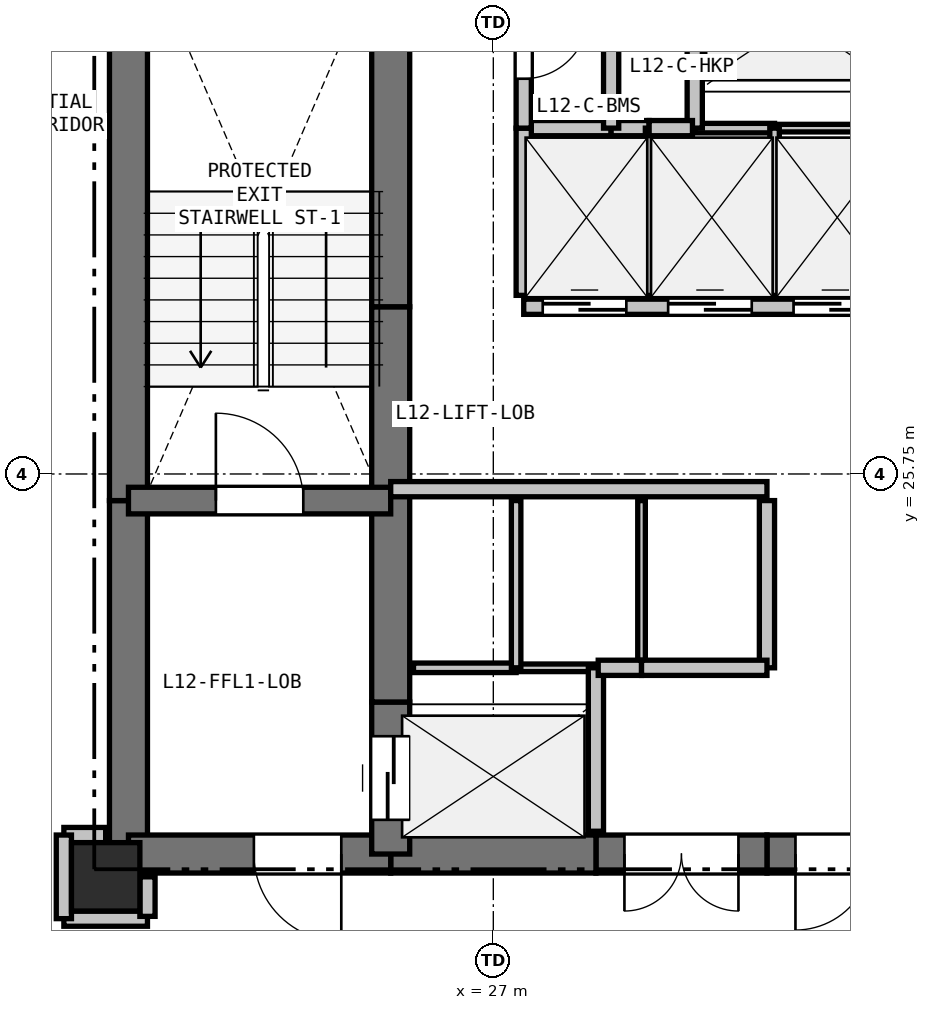
"""IFC4 building model, lengths in metres.
Left out: names, types, materials, properties, quantities, classifications, styles, units other than length and angle.
Written with IfcOpenShell. Run it as: python <this file> out.ifc"""

import sys

from ifc_helpers import new_model, si_unit, direction, frame, frame_2d, origin, origin_2d, place, context, subcontext, project, spatial, rectangle, extrude, element, fill, save


model = new_model("IFC4")
c1 = context("Model", 3, precision=1e-05, world=origin(), true_north=direction((0.0, 1.0)))
c2 = subcontext(c1, "Body", "Model", "MODEL_VIEW")
j1 = project(units=[si_unit("LENGTHUNIT", "METRE"), si_unit("PLANEANGLEUNIT", "RADIAN")], contexts=[c1])
p1 = place(None, origin())
s1 = spatial("IfcSite", under=j1, at=p1, CompositionType="ELEMENT")
p2 = place(p1, origin())
s2 = spatial("IfcBuilding", under=s1, at=p2, CompositionType="ELEMENT")
p3 = place(p2, frame((0.0, 0.0, 45.6)))
s3 = spatial("IfcBuildingStorey", under=s2, at=p3, CompositionType="ELEMENT", Elevation=45.6)
p4 = place(p3, frame((21.9, 20.45, 0.0), z_axis=(0.0, 0.0, 1.0), x_axis=(1.0, 0.0, 0.0)))
e1 = element("IfcColumn", 1, at=p4, inside=s3, PredefinedType="COLUMN", context=c2, shape_type="SweptSolid", body=[
    extrude(rectangle(XDim=0.9, YDim=0.9, at=origin_2d()), origin(), (0.0, 0.0, 1.0), 3.3),
])
p5 = place(p3, frame((22.2, 20.75, 0.0), z_axis=(0.0, 0.0, 1.0), x_axis=(0.0, 1.0, 0.0)))
e2 = element("IfcWall", 2, at=p5, inside=s3, PredefinedType="SHEAR", context=c2, shape_type="SweptSolid", body=[
    extrude(rectangle(XDim=4.65, YDim=0.5, at=frame_2d((2.325, 0.0))), origin(), (0.0, 0.0, 1.0), 3.04),
])
p6 = place(p3, frame((22.2, 25.4, 0.0), z_axis=(0.0, 0.0, 1.0), x_axis=(0.0, 1.0, 0.0)))
e3 = element("IfcWall", 3, at=p6, inside=s3, PredefinedType="SHEAR", context=c2, shape_type="SweptSolid", body=[
    extrude(rectangle(XDim=7.35, YDim=0.5, at=frame_2d((3.675, 0.0))), origin(), (0.0, 0.0, 1.0), 3.04),
])
p7 = place(p3, frame((32.35, 20.75, 0.0), z_axis=(0.0, 0.0, 1.0), x_axis=(-1.0, 0.0, 0.0)))
e4 = element("IfcWall", 4, at=p7, inside=s3, PredefinedType="SHEAR", context=c2, shape_type="SweptSolid", body=[
    extrude(rectangle(XDim=1.75, YDim=0.5, at=frame_2d((0.875, 0.0))), origin(), (0.0, 0.0, 1.0), 3.04),
])
p8 = place(p7, frame((0.375, 0.0, 0.0)))
e5 = element("IfcOpeningElement", 5, at=p8, cuts=e4, PredefinedType="OPENING", context=c2, shape_type="SweptSolid", body=[
    extrude(rectangle(XDim=1.0, YDim=2.15, at=frame_2d((0.5, 1.075))), frame((0.0, 0.26, 0.0), z_axis=(0.0, -1.0, 0.0), x_axis=(1.0, 0.0, 0.0)), (0.0, 0.0, 1.0), 0.52),
])
p9 = place(p3, frame((30.6, 20.75, 0.0), z_axis=(0.0, 0.0, 1.0), x_axis=(-1.0, 0.0, 0.0)))
e6 = element("IfcWall", 6, at=p9, inside=s3, PredefinedType="SHEAR", context=c2, shape_type="SweptSolid", body=[
    extrude(rectangle(XDim=2.25, YDim=0.5, at=frame_2d((1.125, 0.0))), origin(), (0.0, 0.0, 1.0), 3.04),
])
p10 = place(p9, frame((0.375, 0.0, 0.0)))
e7 = element("IfcOpeningElement", 7, at=p10, cuts=e6, PredefinedType="OPENING", context=c2, shape_type="SweptSolid", body=[
    extrude(rectangle(XDim=1.5, YDim=2.2, at=frame_2d((0.75, 1.1))), frame((0.0, 0.26, 0.0), z_axis=(0.0, -1.0, 0.0), x_axis=(1.0, 0.0, 0.0)), (0.0, 0.0, 1.0), 0.52),
])
p11 = place(p3, frame((28.35, 20.75, 0.0), z_axis=(0.0, 0.0, 1.0), x_axis=(-1.0, 0.0, 0.0)))
e8 = element("IfcWall", 8, at=p11, inside=s3, PredefinedType="SHEAR", context=c2, shape_type="SweptSolid", body=[
    extrude(rectangle(XDim=2.7, YDim=0.5, at=frame_2d((1.35, 0.0))), origin(), (0.0, 0.0, 1.0), 3.04),
])
p12 = place(p3, frame((25.65, 20.75, 0.0), z_axis=(0.0, 0.0, 1.0), x_axis=(-1.0, 0.0, 0.0)))
e9 = element("IfcWall", 9, at=p12, inside=s3, PredefinedType="SHEAR", context=c2, shape_type="SweptSolid", body=[
    extrude(rectangle(XDim=3.45, YDim=0.5, at=frame_2d((1.725, 0.0))), origin(), (0.0, 0.0, 1.0), 3.04),
])
p13 = place(p12, frame((0.65, 0.0, 0.0)))
e10 = element("IfcOpeningElement", 10, at=p13, cuts=e9, PredefinedType="OPENING", context=c2, shape_type="SweptSolid", body=[
    extrude(rectangle(XDim=1.15, YDim=2.15, at=frame_2d((0.575, 1.075))), frame((0.0, 0.26, 0.0), z_axis=(0.0, -1.0, 0.0), x_axis=(1.0, 0.0, 0.0)), (0.0, 0.0, 1.0), 0.52),
])
p14 = place(p3, frame((25.65, 20.75, 0.0), z_axis=(0.0, 0.0, 1.0), x_axis=(0.0, 1.0, 0.0)))
e11 = element("IfcWall", 11, at=p14, inside=s3, PredefinedType="SHEAR", context=c2, shape_type="SweptSolid", body=[
    extrude(rectangle(XDim=2.0, YDim=0.5, at=frame_2d((1.0, 0.0))), origin(), (0.0, 0.0, 1.0), 3.04),
])
p15 = place(p14, frame((0.45, 0.0, 0.0)))
e12 = element("IfcOpeningElement", 12, at=p15, cuts=e11, PredefinedType="OPENING", context=c2, shape_type="SweptSolid", body=[
    extrude(rectangle(XDim=1.1, YDim=2.15, at=frame_2d((0.55, 1.075))), frame((0.0, 0.26, 0.0), z_axis=(0.0, -1.0, 0.0), x_axis=(1.0, 0.0, 0.0)), (0.0, 0.0, 1.0), 0.52),
])
p16 = place(p3, frame((25.65, 22.75, 0.0), z_axis=(0.0, 0.0, 1.0), x_axis=(0.0, 1.0, 0.0)))
e13 = element("IfcWall", 13, at=p16, inside=s3, PredefinedType="SHEAR", context=c2, shape_type="SweptSolid", body=[
    extrude(rectangle(XDim=2.8, YDim=0.5, at=frame_2d((1.4, 0.0))), origin(), (0.0, 0.0, 1.0), 3.04),
])
p17 = place(p3, frame((25.65, 25.55, 0.0), z_axis=(0.0, 0.0, 1.0), x_axis=(0.0, 1.0, 0.0)))
e14 = element("IfcWall", 14, at=p17, inside=s3, PredefinedType="SHEAR", context=c2, shape_type="SweptSolid", body=[
    extrude(rectangle(XDim=2.4, YDim=0.5, at=frame_2d((1.2, 0.0))), origin(), (0.0, 0.0, 1.0), 3.04),
])
p18 = place(p3, frame((25.65, 27.95, 0.0), z_axis=(0.0, 0.0, 1.0), x_axis=(0.0, 1.0, 0.0)))
e15 = element("IfcWall", 15, at=p18, inside=s3, PredefinedType="SHEAR", context=c2, shape_type="SweptSolid", body=[
    extrude(rectangle(XDim=4.8, YDim=0.5, at=frame_2d((2.4, 0.0))), origin(), (0.0, 0.0, 1.0), 3.04),
])
p19 = place(p3, frame((22.2, 25.4, 0.0), z_axis=(0.0, 0.0, 1.0), x_axis=(1.0, 0.0, 0.0)))
e16 = element("IfcWall", 16, at=p19, inside=s3, PredefinedType="SHEAR", context=c2, shape_type="SweptSolid", body=[
    extrude(rectangle(XDim=3.45, YDim=0.35, at=frame_2d((1.725, 0.0))), origin(), (0.0, 0.0, 1.0), 3.04),
])
p20 = place(p19, frame((1.15, 0.0, 0.0)))
e17 = element("IfcOpeningElement", 17, at=p20, cuts=e16, PredefinedType="OPENING", context=c2, shape_type="SweptSolid", body=[
    extrude(rectangle(XDim=1.15, YDim=2.15, at=frame_2d((0.575, 1.075))), frame((0.0, 0.185, 0.0), z_axis=(0.0, -1.0, 0.0), x_axis=(1.0, 0.0, 0.0)), (0.0, 0.0, 1.0), 0.37),
])
p21 = place(p3, frame((25.65, 25.55, 0.0), z_axis=(0.0, 0.0, 1.0), x_axis=(1.0, 0.0, 0.0)))
e18 = element("IfcWall", 18, at=p21, inside=s3, PredefinedType="PARTITIONING", context=c2, shape_type="SweptSolid", body=[
    extrude(rectangle(XDim=4.95, YDim=0.2, at=frame_2d((2.475, 0.0))), origin(), (0.0, 0.0, 1.0), 3.04),
])
p22 = place(p3, frame((27.4, 27.95, 0.0), z_axis=(0.0, 0.0, 1.0), x_axis=(1.0, 0.0, 0.0)))
e19 = element("IfcWall", 19, at=p22, inside=s3, PredefinedType="PARTITIONING", context=c2, shape_type="SweptSolid", body=[
    extrude(rectangle(XDim=4.95, YDim=0.2, at=frame_2d((2.475, 0.0))), origin(), (0.0, 0.0, 1.0), 3.04),
])
p23 = place(p22, frame((0.25, 0.0, 0.0)))
e20 = element("IfcOpeningElement", 20, at=p23, cuts=e19, PredefinedType="OPENING", context=c2, shape_type="SweptSolid", body=[
    extrude(rectangle(XDim=1.1, YDim=2.15, at=frame_2d((0.55, 1.075))), frame((0.0, 0.11, 0.0), z_axis=(0.0, -1.0, 0.0), x_axis=(1.0, 0.0, 0.0)), (0.0, 0.0, 1.0), 0.22),
])
p24 = place(p22, frame((1.9, 0.0, 0.0)))
e21 = element("IfcOpeningElement", 21, at=p24, cuts=e19, PredefinedType="OPENING", context=c2, shape_type="SweptSolid", body=[
    extrude(rectangle(XDim=1.1, YDim=2.15, at=frame_2d((0.55, 1.075))), frame((0.0, 0.11, 0.0), z_axis=(0.0, -1.0, 0.0), x_axis=(1.0, 0.0, 0.0)), (0.0, 0.0, 1.0), 0.22),
])
p25 = place(p22, frame((3.55, 0.0, 0.0)))
e22 = element("IfcOpeningElement", 22, at=p25, cuts=e19, PredefinedType="OPENING", context=c2, shape_type="SweptSolid", body=[
    extrude(rectangle(XDim=1.1, YDim=2.15, at=frame_2d((0.55, 1.075))), frame((0.0, 0.11, 0.0), z_axis=(0.0, -1.0, 0.0), x_axis=(1.0, 0.0, 0.0)), (0.0, 0.0, 1.0), 0.22),
])
p26 = place(p3, frame((25.95, 23.2, 0.0), z_axis=(0.0, 0.0, 1.0), x_axis=(1.0, 0.0, 0.0)))
e23 = element("IfcWall", 23, at=p26, inside=s3, PredefinedType="PARTITIONING", context=c2, shape_type="SweptSolid", body=[
    extrude(rectangle(XDim=1.35, YDim=0.125, at=frame_2d((0.675, 0.0))), origin(), (0.0, 0.0, 1.0), 3.04),
])
p27 = place(p3, frame((27.3, 23.2, 0.0), z_axis=(0.0, 0.0, 1.0), x_axis=(1.0, 0.0, 0.0)))
e24 = element("IfcWall", 24, at=p27, inside=s3, PredefinedType="PARTITIONING", context=c2, shape_type="SweptSolid", body=[
    extrude(rectangle(XDim=1.05, YDim=0.1, at=frame_2d((0.525, 0.0))), origin(), (0.0, 0.0, 1.0), 3.04),
])
p28 = place(p3, frame((28.35, 23.2, 0.0), z_axis=(0.0, 0.0, 1.0), x_axis=(0.0, -1.0, 0.0)))
e25 = element("IfcWall", 25, at=p28, inside=s3, PredefinedType="PARTITIONING", context=c2, shape_type="SweptSolid", body=[
    extrude(rectangle(XDim=2.15, YDim=0.2, at=frame_2d((1.075, 0.0))), origin(), (0.0, 0.0, 1.0), 3.04),
])
p29 = place(p3, frame((32.05, 30.3, 0.0), z_axis=(0.0, 0.0, 1.0), x_axis=(-1.0, 0.0, 0.0)))
e26 = element("IfcWall", 26, at=p29, inside=s3, PredefinedType="PARTITIONING", context=c2, shape_type="SweptSolid", body=[
    extrude(rectangle(XDim=1.35, YDim=0.1, at=frame_2d((0.675, 0.0))), origin(), (0.0, 0.0, 1.0), 3.04),
])
p30 = place(p3, frame((30.7, 30.3, 0.0), z_axis=(0.0, 0.0, 1.0), x_axis=(-1.0, 0.0, 0.0)))
e27 = element("IfcWall", 27, at=p30, inside=s3, PredefinedType="PARTITIONING", context=c2, shape_type="SweptSolid", body=[
    extrude(rectangle(XDim=1.05, YDim=0.125, at=frame_2d((0.525, 0.0))), origin(), (0.0, 0.0, 1.0), 3.04),
])
p31 = place(p3, frame((29.65, 30.3, 0.0), z_axis=(0.0, 0.0, 1.0), x_axis=(0.0, 1.0, 0.0)))
e28 = element("IfcWall", 28, at=p31, inside=s3, PredefinedType="PARTITIONING", context=c2, shape_type="SweptSolid", body=[
    extrude(rectangle(XDim=2.15, YDim=0.2, at=frame_2d((1.075, 0.0))), origin(), (0.0, 0.0, 1.0), 3.04),
])
p32 = place(p3, frame((27.3, 25.4, 0.0), z_axis=(0.0, 0.0, 1.0), x_axis=(0.0, -1.0, 0.0)))
e29 = element("IfcWall", 29, at=p32, inside=s3, PredefinedType="PARTITIONING", context=c2, shape_type="SweptSolid", body=[
    extrude(rectangle(XDim=2.2, YDim=0.125, at=frame_2d((1.1, 0.0))), origin(), (0.0, 0.0, 1.0), 3.04),
])
p33 = place(p3, frame((28.95, 25.4, 0.0), z_axis=(0.0, 0.0, 1.0), x_axis=(0.0, -1.0, 0.0)))
e30 = element("IfcWall", 30, at=p33, inside=s3, PredefinedType="PARTITIONING", context=c2, shape_type="SweptSolid", body=[
    extrude(rectangle(XDim=2.2, YDim=0.1, at=frame_2d((1.1, 0.0))), origin(), (0.0, 0.0, 1.0), 3.04),
])
p34 = place(p3, frame((28.95, 23.2, 0.0), z_axis=(0.0, 0.0, 1.0), x_axis=(-1.0, 0.0, 0.0)))
e31 = element("IfcWall", 31, at=p34, inside=s3, PredefinedType="PARTITIONING", context=c2, shape_type="SweptSolid", body=[
    extrude(rectangle(XDim=0.57, YDim=0.2, at=frame_2d((0.285, 0.0))), origin(), (0.0, 0.0, 1.0), 3.04),
])
p35 = place(p3, frame((30.6, 25.4, 0.0), z_axis=(0.0, 0.0, 1.0), x_axis=(0.0, -1.0, 0.0)))
e32 = element("IfcWall", 32, at=p35, inside=s3, PredefinedType="PARTITIONING", context=c2, shape_type="SweptSolid", body=[
    extrude(rectangle(XDim=2.2, YDim=0.2, at=frame_2d((1.1, 0.0))), origin(), (0.0, 0.0, 1.0), 3.04),
])
p36 = place(p3, frame((30.6, 23.2, 0.0), z_axis=(0.0, 0.0, 1.0), x_axis=(-1.0, 0.0, 0.0)))
e33 = element("IfcWall", 33, at=p36, inside=s3, PredefinedType="PARTITIONING", context=c2, shape_type="SweptSolid", body=[
    extrude(rectangle(XDim=1.65, YDim=0.2, at=frame_2d((0.825, 0.0))), origin(), (0.0, 0.0, 1.0), 3.04),
])
p37 = place(p3, frame((27.4, 30.3, 0.0), z_axis=(0.0, 0.0, 1.0), x_axis=(1.0, 0.0, 0.0)))
e34 = element("IfcWall", 34, at=p37, inside=s3, PredefinedType="PARTITIONING", context=c2, shape_type="SweptSolid", body=[
    extrude(rectangle(XDim=1.15, YDim=0.2, at=frame_2d((0.575, 0.0))), origin(), (0.0, 0.0, 1.0), 3.04),
])
p38 = place(p3, frame((28.55, 30.3, 0.0), z_axis=(0.0, 0.0, 1.0), x_axis=(1.0, 0.0, 0.0)))
e35 = element("IfcWall", 35, at=p38, inside=s3, PredefinedType="PARTITIONING", context=c2, shape_type="SweptSolid", body=[
    extrude(rectangle(XDim=0.5, YDim=0.2, at=frame_2d((0.25, 0.0))), origin(), (0.0, 0.0, 1.0), 3.04),
])
p39 = place(p3, frame((29.05, 30.3, 0.0), z_axis=(0.0, 0.0, 1.0), x_axis=(0.0, -1.0, 0.0)))
e36 = element("IfcWall", 36, at=p39, inside=s3, PredefinedType="PARTITIONING", context=c2, shape_type="SweptSolid", body=[
    extrude(rectangle(XDim=2.2, YDim=0.1, at=frame_2d((1.1, 0.0))), origin(), (0.0, 0.0, 1.0), 3.04),
])
p40 = place(p3, frame((27.4, 28.1, 0.0), z_axis=(0.0, 0.0, 1.0), x_axis=(0.0, 1.0, 0.0)))
e37 = element("IfcWall", 37, at=p40, inside=s3, PredefinedType="PARTITIONING", context=c2, shape_type="SweptSolid", body=[
    extrude(rectangle(XDim=2.2, YDim=0.2, at=frame_2d((1.1, 0.0))), origin(), (0.0, 0.0, 1.0), 3.04),
])
p41 = place(p3, frame((29.05, 30.3, 0.0), z_axis=(0.0, 0.0, 1.0), x_axis=(1.0, 0.0, 0.0)))
e38 = element("IfcWall", 38, at=p41, inside=s3, PredefinedType="PARTITIONING", context=c2, shape_type="SweptSolid", body=[
    extrude(rectangle(XDim=0.57, YDim=0.2, at=frame_2d((0.285, 0.0))), origin(), (0.0, 0.0, 1.0), 3.04),
])
p42 = place(p3, frame((30.7, 30.3, 0.0), z_axis=(0.0, 0.0, 1.0), x_axis=(0.0, -1.0, 0.0)))
e39 = element("IfcWall", 39, at=p42, inside=s3, PredefinedType="PARTITIONING", context=c2, shape_type="SweptSolid", body=[
    extrude(rectangle(XDim=2.2, YDim=0.125, at=frame_2d((1.1, 0.0))), origin(), (0.0, 0.0, 1.0), 3.04),
])
p43 = place(p3, frame((27.4, 32.45, 0.0), z_axis=(0.0, 0.0, 1.0), x_axis=(0.0, -1.0, 0.0)))
e40 = element("IfcWall", 40, at=p43, inside=s3, PredefinedType="PARTITIONING", context=c2, shape_type="SweptSolid", body=[
    extrude(rectangle(XDim=2.15, YDim=0.2, at=frame_2d((1.075, 0.0))), origin(), (0.0, 0.0, 1.0), 3.04),
])
p44 = place(p43, frame((0.65, 0.0, 0.0)))
e41 = element("IfcOpeningElement", 41, at=p44, cuts=e40, PredefinedType="OPENING", context=c2, shape_type="SweptSolid", body=[
    extrude(rectangle(XDim=0.85, YDim=2.1, at=frame_2d((0.425, 1.05))), frame((0.0, 0.11, 0.0), z_axis=(0.0, -1.0, 0.0), x_axis=(1.0, 0.0, 0.0)), (0.0, 0.0, 1.0), 0.22),
])
p45 = place(p3, frame((21.35, 19.9, 0.0), z_axis=(0.0, 0.0, 1.0), x_axis=(1.0, 0.0, 0.0)))
e42 = element("IfcWall", 42, at=p45, inside=s3, PredefinedType="PARTITIONING", context=c2, shape_type="SweptSolid", body=[
    extrude(rectangle(XDim=1.1, YDim=0.2, at=frame_2d((0.55, 0.0))), origin(), (0.0, 0.0, 1.0), 2.337),
])
p46 = place(p3, frame((22.45, 19.93, 0.0), z_axis=(0.0, 0.0, 1.0), x_axis=(0.0, 1.0, 0.0)))
e43 = element("IfcWall", 43, at=p46, inside=s3, PredefinedType="PARTITIONING", context=c2, shape_type="SweptSolid", body=[
    extrude(rectangle(XDim=0.52, YDim=0.2, at=frame_2d((0.26, 0.0))), origin(), (0.0, 0.0, 1.0), 2.337),
])
p47 = place(p3, frame((21.9, 21.0, 0.0), z_axis=(0.0, 0.0, 1.0), x_axis=(-1.0, 0.0, 0.0)))
e44 = element("IfcWall", 44, at=p47, inside=s3, PredefinedType="PARTITIONING", context=c2, shape_type="SweptSolid", body=[
    extrude(rectangle(XDim=0.55, YDim=0.2, at=frame_2d((0.275, 0.0))), origin(), (0.0, 0.0, 1.0), 2.488),
])
p48 = place(p3, frame((21.35, 21.0, 0.0), z_axis=(0.0, 0.0, 1.0), x_axis=(0.0, -1.0, 0.0)))
e45 = element("IfcWall", 45, at=p48, inside=s3, PredefinedType="PARTITIONING", context=c2, shape_type="SweptSolid", body=[
    extrude(rectangle(XDim=1.1, YDim=0.2, at=frame_2d((0.55, 0.0))), origin(), (0.0, 0.0, 1.0), 2.337),
])
p49 = place(p3, frame((28.55, 32.45, 0.0), z_axis=(0.0, 0.0, 1.0), x_axis=(0.0, -1.0, 0.0)))
e46 = element("IfcWall", 46, at=p49, inside=s3, PredefinedType="PARTITIONING", context=c2, shape_type="SweptSolid", body=[
    extrude(rectangle(XDim=2.15, YDim=0.2, at=frame_2d((1.075, 0.0))), origin(), (0.0, 0.0, 1.0), 3.04),
])
p50 = place(p23, origin())
e47 = element("IfcDoor", 47, at=p50, inside=s3, OperationType="SLIDING_TO_LEFT", PredefinedType="DOOR", context=c2, shape_type="SweptSolid", body=[
    extrude(rectangle(XDim=1.1, YDim=2.15, at=frame_2d((0.55, 1.075))), frame((0.0, 0.025, 0.0), z_axis=(0.0, -1.0, 0.0), x_axis=(1.0, 0.0, 0.0)), (0.0, 0.0, 1.0), 0.05),
])
fill(e20, e47)
p51 = place(p24, origin())
e48 = element("IfcDoor", 48, at=p51, inside=s3, OperationType="SLIDING_TO_LEFT", PredefinedType="DOOR", context=c2, shape_type="SweptSolid", body=[
    extrude(rectangle(XDim=1.1, YDim=2.15, at=frame_2d((0.55, 1.075))), frame((0.0, 0.025, 0.0), z_axis=(0.0, -1.0, 0.0), x_axis=(1.0, 0.0, 0.0)), (0.0, 0.0, 1.0), 0.05),
])
fill(e21, e48)
p52 = place(p25, origin())
e49 = element("IfcDoor", 49, at=p52, inside=s3, OperationType="SLIDING_TO_LEFT", PredefinedType="DOOR", context=c2, shape_type="SweptSolid", body=[
    extrude(rectangle(XDim=1.1, YDim=2.15, at=frame_2d((0.55, 1.075))), frame((0.0, 0.025, 0.0), z_axis=(0.0, -1.0, 0.0), x_axis=(1.0, 0.0, 0.0)), (0.0, 0.0, 1.0), 0.05),
])
fill(e22, e49)
p53 = place(p8, origin())
e50 = element("IfcDoor", 50, at=p53, inside=s3, OperationType="SINGLE_SWING_RIGHT", PredefinedType="DOOR", context=c2, shape_type="SweptSolid", body=[
    extrude(rectangle(XDim=1.0, YDim=2.15, at=frame_2d((0.5, 1.075))), frame((0.0, 0.025, 0.0), z_axis=(0.0, -1.0, 0.0), x_axis=(1.0, 0.0, 0.0)), (0.0, 0.0, 1.0), 0.05),
])
fill(e5, e50)
p54 = place(p15, origin())
e51 = element("IfcDoor", 51, at=p54, inside=s3, OperationType="SLIDING_TO_LEFT", PredefinedType="DOOR", context=c2, shape_type="SweptSolid", body=[
    extrude(rectangle(XDim=1.1, YDim=2.15, at=frame_2d((0.55, 1.075))), frame((0.0, 0.025, 0.0), z_axis=(0.0, -1.0, 0.0), x_axis=(1.0, 0.0, 0.0)), (0.0, 0.0, 1.0), 0.05),
])
fill(e12, e51)
p55 = place(p20, origin())
e52 = element("IfcDoor", 52, at=p55, inside=s3, OperationType="SINGLE_SWING_LEFT", PredefinedType="DOOR", context=c2, shape_type="SweptSolid", body=[
    extrude(rectangle(XDim=1.15, YDim=2.15, at=frame_2d((0.575, 1.075))), frame((0.0, 0.025, 0.0), z_axis=(0.0, -1.0, 0.0), x_axis=(1.0, 0.0, 0.0)), (0.0, 0.0, 1.0), 0.05),
])
fill(e17, e52)
p56 = place(p13, origin())
e53 = element("IfcDoor", 53, at=p56, inside=s3, OperationType="SINGLE_SWING_LEFT", PredefinedType="DOOR", context=c2, shape_type="SweptSolid", body=[
    extrude(rectangle(XDim=1.15, YDim=2.15, at=frame_2d((0.575, 1.075))), frame((0.0, 0.025, 0.0), z_axis=(0.0, -1.0, 0.0), x_axis=(1.0, 0.0, 0.0)), (0.0, 0.0, 1.0), 0.05),
])
fill(e10, e53)
p57 = place(p10, origin())
e54 = element("IfcDoor", 54, at=p57, inside=s3, OperationType="DOUBLE_DOOR_SINGLE_SWING", PredefinedType="DOOR", context=c2, shape_type="SweptSolid", body=[
    extrude(rectangle(XDim=1.5, YDim=2.2, at=frame_2d((0.75, 1.1))), frame((0.0, 0.025, 0.0), z_axis=(0.0, -1.0, 0.0), x_axis=(1.0, 0.0, 0.0)), (0.0, 0.0, 1.0), 0.05),
])
fill(e7, e54)
p58 = place(p44, origin())
e55 = element("IfcDoor", 55, at=p58, inside=s3, OperationType="SINGLE_SWING_LEFT", PredefinedType="DOOR", context=c2, shape_type="SweptSolid", body=[
    extrude(rectangle(XDim=0.85, YDim=2.1, at=frame_2d((0.425, 1.05))), frame((0.0, 0.025, 0.0), z_axis=(0.0, -1.0, 0.0), x_axis=(1.0, 0.0, 0.0)), (0.0, 0.0, 1.0), 0.05),
])
fill(e41, e55)
save(model, sys.argv[1])
